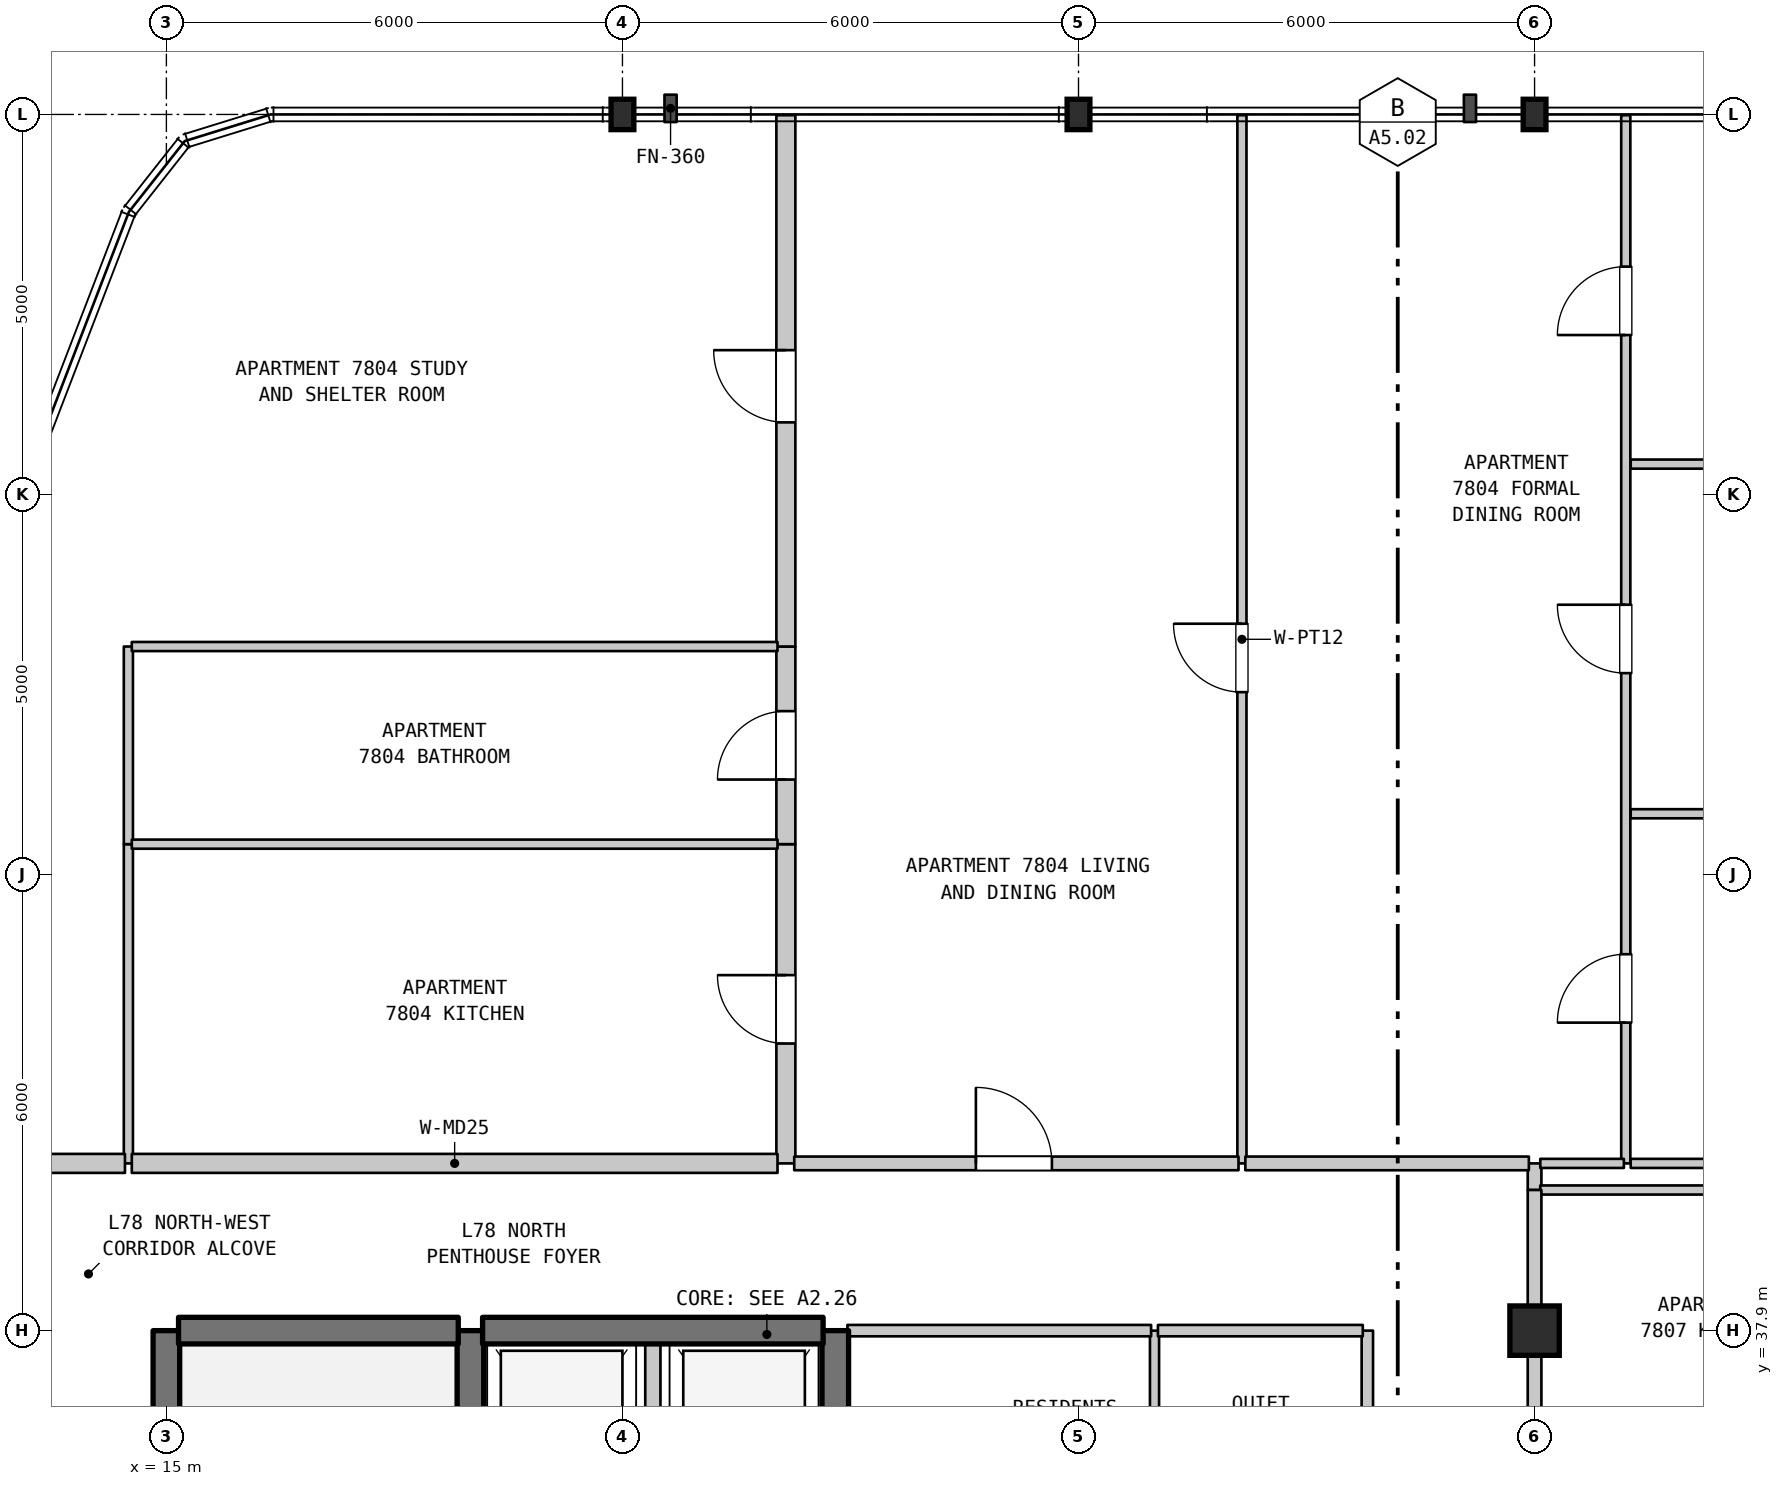
"""IFC4 building model, lengths in metres.
Left out: names, types, materials, properties, quantities, classifications, styles, units other than length and angle.
Written with IfcOpenShell. Run it as: python <this file> out.ifc"""

import sys

from ifc_helpers import new_model, si_unit, direction, frame, frame_2d, origin, origin_2d, place, context, subcontext, project, spatial, rectangle, i_section, extrude, element, fill, save


model = new_model("IFC4")
c1 = context("Model", 3, precision=1e-05, world=origin(), true_north=direction((0.0, 1.0)))
c2 = subcontext(c1, "Body", "Model", "MODEL_VIEW")
j1 = project(units=[si_unit("LENGTHUNIT", "METRE"), si_unit("PLANEANGLEUNIT", "RADIAN")], contexts=[c1])
p1 = place(None, origin())
s1 = spatial("IfcSite", under=j1, at=p1, CompositionType="ELEMENT")
p2 = place(p1, origin())
s2 = spatial("IfcBuilding", under=s1, at=p2, CompositionType="ELEMENT")
p3 = place(p2, frame((0.0, 0.0, 311.0)))
s3 = spatial("IfcBuildingStorey", under=s2, at=p3, CompositionType="ELEMENT", Elevation=311.0)
for number, where, z_axis, x_axis in (
    (1, (21.0, 53.9, 0.0), (0.0, 0.0, 1.0), (1.0, 0.0, 0.0)),
    (2, (27.0, 53.9, 0.0), (0.0, 0.0, 1.0), (1.0, 0.0, 0.0)),
):
    element("IfcColumn", number, at=place(p3, frame(where, z_axis=z_axis, x_axis=x_axis)), inside=s3, PredefinedType="COLUMN", context=c2, shape_type="SweptSolid", body=[
        extrude(i_section(OverallWidth=0.3, OverallDepth=0.4, WebThickness=0.013, FlangeThickness=0.024, FilletRadius=0.027, at=origin_2d()), origin(), (0.0, 0.0, 1.0), 3.7),
    ])
p4 = place(p3, frame((33.0, 37.9, 0.0), z_axis=(0.0, 0.0, 1.0), x_axis=(1.0, 0.0, 0.0)))
e3 = element("IfcColumn", 3, at=p4, inside=s3, PredefinedType="COLUMN", context=c2, shape_type="SweptSolid", body=[
    extrude(rectangle(XDim=0.65, YDim=0.65, at=origin_2d()), origin(), (0.0, 0.0, 1.0), 3.7),
])
p5 = place(p3, frame((33.0, 53.9, 0.0), z_axis=(0.0, 0.0, 1.0), x_axis=(1.0, 0.0, 0.0)))
e4 = element("IfcColumn", 4, at=p5, inside=s3, PredefinedType="COLUMN", context=c2, shape_type="SweptSolid", body=[
    extrude(i_section(OverallWidth=0.3, OverallDepth=0.4, WebThickness=0.013, FlangeThickness=0.024, FilletRadius=0.027, at=origin_2d()), origin(), (0.0, 0.0, 1.0), 3.7),
])
p6 = place(p3, frame((14.5, 40.1, 0.0), z_axis=(0.0, 0.0, 1.0), x_axis=(0.0, 1.0, 0.0)))
e5 = element("IfcWall", 5, at=p6, inside=s3, PredefinedType="PARTITIONING", context=c2, shape_type="SweptSolid", body=[
    extrude(rectangle(XDim=4.2, YDim=0.12, at=frame_2d((2.1, 0.0))), origin(), (0.0, 0.0, 1.0), 3.28),
])
p7 = place(p3, frame((14.5, 44.3, 0.0), z_axis=(0.0, 0.0, 1.0), x_axis=(0.0, 1.0, 0.0)))
e6 = element("IfcWall", 6, at=p7, inside=s3, PredefinedType="PARTITIONING", context=c2, shape_type="SweptSolid", body=[
    extrude(rectangle(XDim=2.6, YDim=0.12, at=frame_2d((1.3, 0.0))), origin(), (0.0, 0.0, 1.0), 3.28),
])
p8 = place(p3, frame((15.0, 31.1, 0.0), z_axis=(0.0, 0.0, 1.0), x_axis=(0.0, 1.0, 0.0)))
e7 = element("IfcWall", 7, at=p8, inside=s3, PredefinedType="SHEAR", context=c2, shape_type="SweptSolid", body=[
    extrude(rectangle(XDim=6.8, YDim=0.35, at=frame_2d((3.4, 0.0))), origin(), (0.0, 0.0, 1.0), 3.28),
])
p9 = place(p3, frame((19.0, 35.0, 0.0), z_axis=(0.0, 0.0, 1.0), x_axis=(0.0, 1.0, 0.0)))
e8 = element("IfcWall", 8, at=p9, inside=s3, PredefinedType="SHEAR", context=c2, shape_type="SweptSolid", body=[
    extrude(rectangle(XDim=2.9, YDim=0.35, at=frame_2d((1.45, 0.0))), origin(), (0.0, 0.0, 1.0), 3.28),
])
p10 = place(p3, frame((21.4, 35.0, 0.0), z_axis=(0.0, 0.0, 1.0), x_axis=(0.0, 1.0, 0.0)))
e9 = element("IfcWall", 9, at=p10, inside=s3, PredefinedType="STANDARD", context=c2, shape_type="SweptSolid", body=[
    extrude(rectangle(XDim=2.9, YDim=0.2, at=frame_2d((1.45, 0.0))), origin(), (0.0, 0.0, 1.0), 3.28),
])
p11 = place(p3, frame((23.15, 40.1, 0.0), z_axis=(0.0, 0.0, 1.0), x_axis=(0.0, 1.0, 0.0)))
e10 = element("IfcWall", 10, at=p11, inside=s3, PredefinedType="STANDARD", context=c2, shape_type="SweptSolid", body=[
    extrude(rectangle(XDim=4.2, YDim=0.25, at=frame_2d((2.1, 0.0))), origin(), (0.0, 0.0, 1.0), 3.28),
])
p12 = place(p11, frame((1.577, 0.0, 0.0)))
e11 = element("IfcOpeningElement", 11, at=p12, cuts=e10, PredefinedType="OPENING", context=c2, shape_type="SweptSolid", body=[
    extrude(rectangle(XDim=0.9, YDim=2.15, at=frame_2d((0.45, 1.075))), frame((0.0, 0.135, 0.0), z_axis=(0.0, -1.0, 0.0), x_axis=(1.0, 0.0, 0.0)), (0.0, 0.0, 1.0), 0.27),
])
p13 = place(p3, frame((23.15, 44.3, 0.0), z_axis=(0.0, 0.0, 1.0), x_axis=(0.0, 1.0, 0.0)))
e12 = element("IfcWall", 12, at=p13, inside=s3, PredefinedType="STANDARD", context=c2, shape_type="SweptSolid", body=[
    extrude(rectangle(XDim=2.6, YDim=0.25, at=frame_2d((1.3, 0.0))), origin(), (0.0, 0.0, 1.0), 3.28),
])
p14 = place(p13, frame((0.85, 0.0, 0.0)))
e13 = element("IfcOpeningElement", 13, at=p14, cuts=e12, PredefinedType="OPENING", context=c2, shape_type="SweptSolid", body=[
    extrude(rectangle(XDim=0.9, YDim=2.1, at=frame_2d((0.45, 1.05))), frame((0.0, 0.135, 0.0), z_axis=(0.0, -1.0, 0.0), x_axis=(1.0, 0.0, 0.0)), (0.0, 0.0, 1.0), 0.27),
])
p15 = place(p3, frame((23.15, 46.9, 0.0), z_axis=(0.0, 0.0, 1.0), x_axis=(0.0, 1.0, 0.0)))
e14 = element("IfcWall", 14, at=p15, inside=s3, PredefinedType="STANDARD", context=c2, shape_type="SweptSolid", body=[
    extrude(rectangle(XDim=6.99, YDim=0.25, at=frame_2d((3.495, 0.0))), origin(), (0.0, 0.0, 1.0), 3.28),
])
p16 = place(p15, frame((2.949, 0.0, 0.0)))
e15 = element("IfcOpeningElement", 15, at=p16, cuts=e14, PredefinedType="OPENING", context=c2, shape_type="SweptSolid", body=[
    extrude(rectangle(XDim=0.95, YDim=2.15, at=frame_2d((0.475, 1.075))), frame((0.0, 0.135, 0.0), z_axis=(0.0, -1.0, 0.0), x_axis=(1.0, 0.0, 0.0)), (0.0, 0.0, 1.0), 0.27),
])
p17 = place(p3, frame((23.8, 35.0, 0.0), z_axis=(0.0, 0.0, 1.0), x_axis=(0.0, 1.0, 0.0)))
e16 = element("IfcWall", 16, at=p17, inside=s3, PredefinedType="SHEAR", context=c2, shape_type="SweptSolid", body=[
    extrude(rectangle(XDim=2.9, YDim=0.35, at=frame_2d((1.45, 0.0))), origin(), (0.0, 0.0, 1.0), 3.28),
])
p18 = place(p3, frame((28.0, 35.0, 0.0), z_axis=(0.0, 0.0, 1.0), x_axis=(0.0, 1.0, 0.0)))
e17 = element("IfcWall", 17, at=p18, inside=s3, PredefinedType="PARTITIONING", context=c2, shape_type="SweptSolid", body=[
    extrude(rectangle(XDim=2.9, YDim=0.12, at=frame_2d((1.45, 0.0))), origin(), (0.0, 0.0, 1.0), 3.28),
])
p19 = place(p3, frame((29.15, 40.1, 0.0), z_axis=(0.0, 0.0, 1.0), x_axis=(0.0, 1.0, 0.0)))
e18 = element("IfcWall", 18, at=p19, inside=s3, PredefinedType="PARTITIONING", context=c2, shape_type="SweptSolid", body=[
    extrude(rectangle(XDim=13.79, YDim=0.12, at=frame_2d((6.895, 0.0))), origin(), (0.0, 0.0, 1.0), 3.28),
])
p20 = place(p19, frame((6.2, 0.0, 0.0)))
e19 = element("IfcOpeningElement", 19, at=p20, cuts=e18, PredefinedType="OPENING", context=c2, shape_type="SweptSolid", body=[
    extrude(rectangle(XDim=0.9, YDim=2.15, at=frame_2d((0.45, 1.075))), frame((0.0, 0.07, 0.0), z_axis=(0.0, -1.0, 0.0), x_axis=(1.0, 0.0, 0.0)), (0.0, 0.0, 1.0), 0.14),
])
p21 = place(p3, frame((30.8, 35.0, 0.0), z_axis=(0.0, 0.0, 1.0), x_axis=(0.0, 1.0, 0.0)))
e20 = element("IfcWall", 20, at=p21, inside=s3, PredefinedType="STANDARD", context=c2, shape_type="SweptSolid", body=[
    extrude(rectangle(XDim=2.9, YDim=0.15, at=frame_2d((1.45, 0.0))), origin(), (0.0, 0.0, 1.0), 3.28),
])
p22 = place(p3, frame((33.0, 36.367, 0.0), z_axis=(0.0, 0.0, 1.0), x_axis=(0.0, 1.0, 0.0)))
e21 = element("IfcWall", 21, at=p22, inside=s3, PredefinedType="STANDARD", context=c2, shape_type="SweptSolid", body=[
    extrude(rectangle(XDim=1.533, YDim=0.18, at=frame_2d((0.767, 0.0))), origin(), (0.0, 0.0, 1.0), 2.78),
])
p23 = place(p3, frame((33.0, 39.75, 0.0), z_axis=(0.0, 0.0, 1.0), x_axis=(0.0, 1.0, 0.0)))
e22 = element("IfcWall", 22, at=p23, inside=s3, PredefinedType="STANDARD", context=c2, shape_type="SweptSolid", body=[
    extrude(rectangle(XDim=0.35, YDim=0.18, at=frame_2d((0.175, 0.0))), origin(), (0.0, 0.0, 1.0), 3.28),
])
p24 = place(p3, frame((34.2, 40.1, 0.0), z_axis=(0.0, 0.0, 1.0), x_axis=(0.0, 1.0, 0.0)))
e23 = element("IfcWall", 23, at=p24, inside=s3, PredefinedType="PARTITIONING", context=c2, shape_type="SweptSolid", body=[
    extrude(rectangle(XDim=13.79, YDim=0.12, at=frame_2d((6.895, 0.0))), origin(), (0.0, 0.0, 1.0), 3.28),
])
p25 = place(p24, frame((1.852, 0.0, 0.0)))
e24 = element("IfcOpeningElement", 24, at=p25, cuts=e23, PredefinedType="OPENING", context=c2, shape_type="SweptSolid", body=[
    extrude(rectangle(XDim=0.9, YDim=2.15, at=frame_2d((0.45, 1.075))), frame((0.0, 0.07, 0.0), z_axis=(0.0, -1.0, 0.0), x_axis=(1.0, 0.0, 0.0)), (0.0, 0.0, 1.0), 0.14),
])
p26 = place(p24, frame((6.45, 0.0, 0.0)))
e25 = element("IfcOpeningElement", 25, at=p26, cuts=e23, PredefinedType="OPENING", context=c2, shape_type="SweptSolid", body=[
    extrude(rectangle(XDim=0.9, YDim=2.15, at=frame_2d((0.45, 1.075))), frame((0.0, 0.07, 0.0), z_axis=(0.0, -1.0, 0.0), x_axis=(1.0, 0.0, 0.0)), (0.0, 0.0, 1.0), 0.14),
])
p27 = place(p24, frame((10.898, 0.0, 0.0)))
e26 = element("IfcOpeningElement", 26, at=p27, cuts=e23, PredefinedType="OPENING", context=c2, shape_type="SweptSolid", body=[
    extrude(rectangle(XDim=0.9, YDim=2.15, at=frame_2d((0.45, 1.075))), frame((0.0, 0.07, 0.0), z_axis=(0.0, -1.0, 0.0), x_axis=(1.0, 0.0, 0.0)), (0.0, 0.0, 1.0), 0.14),
])
p28 = place(p3, frame((15.16, 37.9, 0.0), z_axis=(0.0, 0.0, 1.0), x_axis=(1.0, 0.0, 0.0)))
e27 = element("IfcWall", 27, at=p28, inside=s3, PredefinedType="SHEAR", context=c2, shape_type="SweptSolid", body=[
    extrude(rectangle(XDim=3.68, YDim=0.35, at=frame_2d((1.84, 0.0))), origin(), (0.0, 0.0, 1.0), 3.28),
])
p29 = place(p3, frame((19.16, 37.9, 0.0), z_axis=(0.0, 0.0, 1.0), x_axis=(1.0, 0.0, 0.0)))
e28 = element("IfcWall", 28, at=p29, inside=s3, PredefinedType="SHEAR", context=c2, shape_type="SweptSolid", body=[
    extrude(rectangle(XDim=4.48, YDim=0.35, at=frame_2d((2.24, 0.0))), origin(), (0.0, 0.0, 1.0), 3.28),
])
p30 = place(p3, frame((23.96, 37.9, 0.0), z_axis=(0.0, 0.0, 1.0), x_axis=(1.0, 0.0, 0.0)))
e29 = element("IfcWall", 29, at=p30, inside=s3, PredefinedType="STANDARD", context=c2, shape_type="SweptSolid", body=[
    extrude(rectangle(XDim=3.995, YDim=0.15, at=frame_2d((1.998, 0.0))), origin(), (0.0, 0.0, 1.0), 2.78),
])
p31 = place(p3, frame((28.045, 37.9, 0.0), z_axis=(0.0, 0.0, 1.0), x_axis=(1.0, 0.0, 0.0)))
e30 = element("IfcWall", 30, at=p31, inside=s3, PredefinedType="STANDARD", context=c2, shape_type="SweptSolid", body=[
    extrude(rectangle(XDim=2.695, YDim=0.15, at=frame_2d((1.348, 0.0))), origin(), (0.0, 0.0, 1.0), 2.78),
])
p32 = place(p3, frame((33.075, 39.75, 0.0), z_axis=(0.0, 0.0, 1.0), x_axis=(1.0, 0.0, 0.0)))
e31 = element("IfcWall", 31, at=p32, inside=s3, PredefinedType="PARTITIONING", context=c2, shape_type="SweptSolid", body=[
    extrude(rectangle(XDim=4.46, YDim=0.12, at=frame_2d((2.23, 0.0))), origin(), (0.0, 0.0, 1.0), 3.28),
])
p33 = place(p3, frame((12.975, 40.1, 0.0), z_axis=(0.0, 0.0, 1.0), x_axis=(1.0, 0.0, 0.0)))
e32 = element("IfcWall", 32, at=p33, inside=s3, PredefinedType="STANDARD", context=c2, shape_type="SweptSolid", body=[
    extrude(rectangle(XDim=1.48, YDim=0.25, at=frame_2d((0.74, 0.0))), origin(), (0.0, 0.0, 1.0), 3.28),
])
p34 = place(p3, frame((14.545, 40.1, 0.0), z_axis=(0.0, 0.0, 1.0), x_axis=(1.0, 0.0, 0.0)))
e33 = element("IfcWall", 33, at=p34, inside=s3, PredefinedType="STANDARD", context=c2, shape_type="SweptSolid", body=[
    extrude(rectangle(XDim=8.495, YDim=0.25, at=frame_2d((4.248, 0.0))), origin(), (0.0, 0.0, 1.0), 3.28),
])
p35 = place(p3, frame((23.26, 40.1, 0.0), z_axis=(0.0, 0.0, 1.0), x_axis=(1.0, 0.0, 0.0)))
e34 = element("IfcWall", 34, at=p35, inside=s3, PredefinedType="STANDARD", context=c2, shape_type="SweptSolid", body=[
    extrude(rectangle(XDim=5.845, YDim=0.18, at=frame_2d((2.922, 0.0))), origin(), (0.0, 0.0, 1.0), 3.28),
])
p36 = place(p35, frame((2.39, 0.0, 0.0)))
e35 = element("IfcOpeningElement", 35, at=p36, cuts=e34, PredefinedType="OPENING", context=c2, shape_type="SweptSolid", body=[
    extrude(rectangle(XDim=1.0, YDim=2.15, at=frame_2d((0.5, 1.075))), frame((0.0, 0.1, 0.0), z_axis=(0.0, -1.0, 0.0), x_axis=(1.0, 0.0, 0.0)), (0.0, 0.0, 1.0), 0.2),
])
p37 = place(p3, frame((29.195, 40.1, 0.0), z_axis=(0.0, 0.0, 1.0), x_axis=(1.0, 0.0, 0.0)))
e36 = element("IfcWall", 36, at=p37, inside=s3, PredefinedType="STANDARD", context=c2, shape_type="SweptSolid", body=[
    extrude(rectangle(XDim=3.73, YDim=0.18, at=frame_2d((1.865, 0.0))), origin(), (0.0, 0.0, 1.0), 3.28),
])
p38 = place(p3, frame((33.075, 40.1, 0.0), z_axis=(0.0, 0.0, 1.0), x_axis=(1.0, 0.0, 0.0)))
e37 = element("IfcWall", 37, at=p38, inside=s3, PredefinedType="PARTITIONING", context=c2, shape_type="SweptSolid", body=[
    extrude(rectangle(XDim=1.1, YDim=0.12, at=frame_2d((0.55, 0.0))), origin(), (0.0, 0.0, 1.0), 3.28),
])
p39 = place(p3, frame((34.265, 40.1, 0.0), z_axis=(0.0, 0.0, 1.0), x_axis=(1.0, 0.0, 0.0)))
e38 = element("IfcWall", 38, at=p39, inside=s3, PredefinedType="PARTITIONING", context=c2, shape_type="SweptSolid", body=[
    extrude(rectangle(XDim=6.11, YDim=0.12, at=frame_2d((3.055, 0.0))), origin(), (0.0, 0.0, 1.0), 3.28),
])
p40 = place(p3, frame((14.545, 44.3, 0.0), z_axis=(0.0, 0.0, 1.0), x_axis=(1.0, 0.0, 0.0)))
e39 = element("IfcWall", 39, at=p40, inside=s3, PredefinedType="PARTITIONING", context=c2, shape_type="SweptSolid", body=[
    extrude(rectangle(XDim=8.495, YDim=0.12, at=frame_2d((4.248, 0.0))), origin(), (0.0, 0.0, 1.0), 3.28),
])
p41 = place(p3, frame((34.265, 44.7, 0.0), z_axis=(0.0, 0.0, 1.0), x_axis=(1.0, 0.0, 0.0)))
e40 = element("IfcWall", 40, at=p41, inside=s3, PredefinedType="PARTITIONING", context=c2, shape_type="SweptSolid", body=[
    extrude(rectangle(XDim=6.848, YDim=0.12, at=frame_2d((3.424, 0.0))), origin(), (0.0, 0.0, 1.0), 3.28),
])
p42 = place(p3, frame((14.545, 46.9, 0.0), z_axis=(0.0, 0.0, 1.0), x_axis=(1.0, 0.0, 0.0)))
e41 = element("IfcWall", 41, at=p42, inside=s3, PredefinedType="PARTITIONING", context=c2, shape_type="SweptSolid", body=[
    extrude(rectangle(XDim=8.495, YDim=0.12, at=frame_2d((4.248, 0.0))), origin(), (0.0, 0.0, 1.0), 3.28),
])
p43 = place(p3, frame((34.265, 49.3, 0.0), z_axis=(0.0, 0.0, 1.0), x_axis=(1.0, 0.0, 0.0)))
e42 = element("IfcWall", 42, at=p43, inside=s3, PredefinedType="PARTITIONING", context=c2, shape_type="SweptSolid", body=[
    extrude(rectangle(XDim=5.787, YDim=0.12, at=frame_2d((2.894, 0.0))), origin(), (0.0, 0.0, 1.0), 3.28),
])
p44 = place(p3, frame((33.0, 37.9, 0.0), z_axis=(0.0, 0.0, 1.0), x_axis=(0.0, 1.0, 0.0)))
e43 = element("IfcWall", 43, at=p44, inside=s3, PredefinedType="STANDARD", context=c2, shape_type="SweptSolid", body=[
    extrude(rectangle(XDim=1.85, YDim=0.18, at=frame_2d((0.925, 0.0))), origin(), (0.0, 0.0, 1.0), 2.68),
])
p45 = place(p12, origin())
e44 = element("IfcDoor", 44, at=p45, inside=s3, OperationType="SINGLE_SWING_RIGHT", PredefinedType="DOOR", context=c2, shape_type="SweptSolid", body=[
    extrude(rectangle(XDim=0.9, YDim=2.15, at=frame_2d((0.45, 1.075))), frame((0.0, 0.025, 0.0), z_axis=(0.0, -1.0, 0.0), x_axis=(1.0, 0.0, 0.0)), (0.0, 0.0, 1.0), 0.05),
])
fill(e11, e44)
p46 = place(p14, origin())
e45 = element("IfcDoor", 45, at=p46, inside=s3, OperationType="SINGLE_SWING_LEFT", PredefinedType="DOOR", context=c2, shape_type="SweptSolid", body=[
    extrude(rectangle(XDim=0.9, YDim=2.1, at=frame_2d((0.45, 1.05))), frame((0.0, 0.025, 0.0), z_axis=(0.0, -1.0, 0.0), x_axis=(1.0, 0.0, 0.0)), (0.0, 0.0, 1.0), 0.05),
])
fill(e13, e45)
p47 = place(p16, origin())
e46 = element("IfcDoor", 46, at=p47, inside=s3, OperationType="SINGLE_SWING_RIGHT", PredefinedType="DOOR", context=c2, shape_type="SweptSolid", body=[
    extrude(rectangle(XDim=0.95, YDim=2.15, at=frame_2d((0.475, 1.075))), frame((0.0, 0.025, 0.0), z_axis=(0.0, -1.0, 0.0), x_axis=(1.0, 0.0, 0.0)), (0.0, 0.0, 1.0), 0.05),
])
fill(e15, e46)
p48 = place(p20, origin())
e47 = element("IfcDoor", 47, at=p48, inside=s3, OperationType="SINGLE_SWING_RIGHT", PredefinedType="DOOR", context=c2, shape_type="SweptSolid", body=[
    extrude(rectangle(XDim=0.9, YDim=2.15, at=frame_2d((0.45, 1.075))), frame((0.0, 0.025, 0.0), z_axis=(0.0, -1.0, 0.0), x_axis=(1.0, 0.0, 0.0)), (0.0, 0.0, 1.0), 0.05),
])
fill(e19, e47)
p49 = place(p25, origin())
e48 = element("IfcDoor", 48, at=p49, inside=s3, OperationType="SINGLE_SWING_LEFT", PredefinedType="DOOR", context=c2, shape_type="SweptSolid", body=[
    extrude(rectangle(XDim=0.9, YDim=2.15, at=frame_2d((0.45, 1.075))), frame((0.0, 0.025, 0.0), z_axis=(0.0, -1.0, 0.0), x_axis=(1.0, 0.0, 0.0)), (0.0, 0.0, 1.0), 0.05),
])
fill(e24, e48)
p50 = place(p26, origin())
e49 = element("IfcDoor", 49, at=p50, inside=s3, OperationType="SINGLE_SWING_RIGHT", PredefinedType="DOOR", context=c2, shape_type="SweptSolid", body=[
    extrude(rectangle(XDim=0.9, YDim=2.15, at=frame_2d((0.45, 1.075))), frame((0.0, 0.025, 0.0), z_axis=(0.0, -1.0, 0.0), x_axis=(1.0, 0.0, 0.0)), (0.0, 0.0, 1.0), 0.05),
])
fill(e25, e49)
p51 = place(p27, origin())
e50 = element("IfcDoor", 50, at=p51, inside=s3, OperationType="SINGLE_SWING_LEFT", PredefinedType="DOOR", context=c2, shape_type="SweptSolid", body=[
    extrude(rectangle(XDim=0.9, YDim=2.15, at=frame_2d((0.45, 1.075))), frame((0.0, 0.025, 0.0), z_axis=(0.0, -1.0, 0.0), x_axis=(1.0, 0.0, 0.0)), (0.0, 0.0, 1.0), 0.05),
])
fill(e26, e50)
p52 = place(p36, origin())
e51 = element("IfcDoor", 51, at=p52, inside=s3, OperationType="SINGLE_SWING_LEFT", PredefinedType="DOOR", context=c2, shape_type="SweptSolid", body=[
    extrude(rectangle(XDim=1.0, YDim=2.15, at=frame_2d((0.5, 1.075))), frame((0.0, 0.025, 0.0), z_axis=(0.0, -1.0, 0.0), x_axis=(1.0, 0.0, 0.0)), (0.0, 0.0, 1.0), 0.05),
])
fill(e35, e51)
save(model, sys.argv[1])
